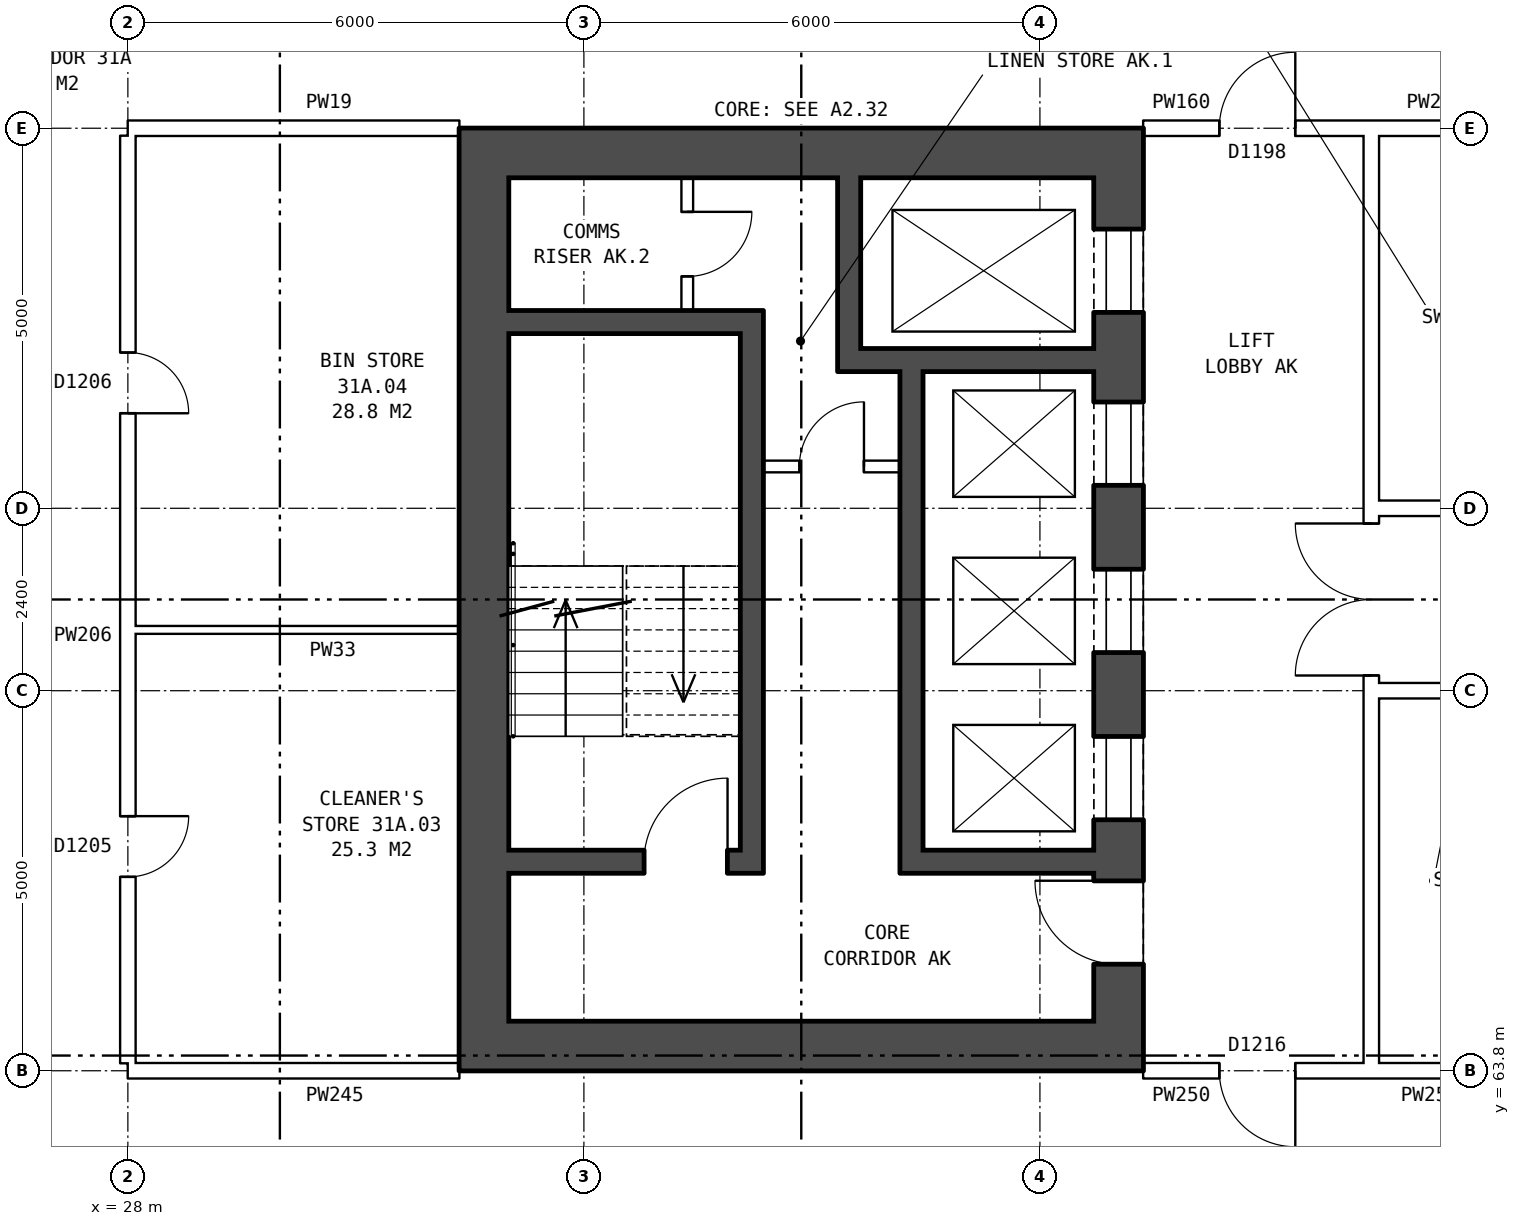
"""IFC4 building model, lengths in metres.
Left out: names, types, materials, properties, quantities, classifications, styles, units other than length and angle.
Written with IfcOpenShell. Run it as: python <this file> out.ifc"""

import sys

from ifc_helpers import new_model, si_unit, direction, frame, frame_2d, origin, place, context, subcontext, project, spatial, rectangle, extrude, element, fill, save


model = new_model("IFC4")
c1 = context("Model", 3, precision=1e-05, world=origin(), true_north=direction((0.0, 1.0)))
c2 = subcontext(c1, "Body", "Model", "MODEL_VIEW")
j1 = project(units=[si_unit("LENGTHUNIT", "METRE"), si_unit("PLANEANGLEUNIT", "RADIAN")], contexts=[c1])
p1 = place(None, origin())
s1 = spatial("IfcSite", under=j1, at=p1, CompositionType="ELEMENT")
p2 = place(p1, origin())
s2 = spatial("IfcBuilding", under=s1, at=p2, CompositionType="ELEMENT")
p3 = place(p2, frame((0.0, 0.0, 111.9)))
s3 = spatial("IfcBuildingStorey", under=s2, at=p3, CompositionType="ELEMENT", Elevation=111.9)
p4 = place(p3, frame((41.035, 75.55, 0.0), z_axis=(0.0, 0.0, 1.0), x_axis=(0.0, -1.0, 0.0)))
e1 = element("IfcWall", 1, at=p4, inside=s3, PredefinedType="SHEAR", context=c2, shape_type="SweptSolid", body=[
    extrude(rectangle(XDim=11.1, YDim=0.65, at=frame_2d((5.55, 0.0))), origin(), (0.0, 0.0, 1.0), 2.85),
])
p5 = place(p4, frame((0.675, 0.0, 0.0)))
e2 = element("IfcOpeningElement", 2, at=p5, cuts=e1, PredefinedType="OPENING", context=c2, shape_type="SweptSolid", body=[
    extrude(rectangle(XDim=1.1, YDim=2.1, at=frame_2d((0.55, 1.05))), frame((0.0, 0.335, 0.0), z_axis=(0.0, -1.0, 0.0), x_axis=(1.0, 0.0, 0.0)), (0.0, 0.0, 1.0), 0.67),
])
p6 = place(p4, frame((2.95, 0.0, 0.0)))
e3 = element("IfcOpeningElement", 3, at=p6, cuts=e1, PredefinedType="OPENING", context=c2, shape_type="SweptSolid", body=[
    extrude(rectangle(XDim=1.1, YDim=2.1, at=frame_2d((0.55, 1.05))), frame((0.0, 0.335, 0.0), z_axis=(0.0, -1.0, 0.0), x_axis=(1.0, 0.0, 0.0)), (0.0, 0.0, 1.0), 0.67),
])
p7 = place(p4, frame((5.15, 0.0, 0.0)))
e4 = element("IfcOpeningElement", 4, at=p7, cuts=e1, PredefinedType="OPENING", context=c2, shape_type="SweptSolid", body=[
    extrude(rectangle(XDim=1.1, YDim=2.1, at=frame_2d((0.55, 1.05))), frame((0.0, 0.335, 0.0), z_axis=(0.0, -1.0, 0.0), x_axis=(1.0, 0.0, 0.0)), (0.0, 0.0, 1.0), 0.67),
])
p8 = place(p4, frame((7.35, 0.0, 0.0)))
e5 = element("IfcOpeningElement", 5, at=p8, cuts=e1, PredefinedType="OPENING", context=c2, shape_type="SweptSolid", body=[
    extrude(rectangle(XDim=1.1, YDim=2.1, at=frame_2d((0.55, 1.05))), frame((0.0, 0.335, 0.0), z_axis=(0.0, -1.0, 0.0), x_axis=(1.0, 0.0, 0.0)), (0.0, 0.0, 1.0), 0.67),
])
p9 = place(p4, frame((9.25, 0.0, 0.0)))
e6 = element("IfcOpeningElement", 6, at=p9, cuts=e1, PredefinedType="OPENING", context=c2, shape_type="SweptSolid", body=[
    extrude(rectangle(XDim=1.1, YDim=2.1, at=frame_2d((0.55, 1.05))), frame((0.0, 0.335, 0.0), z_axis=(0.0, -1.0, 0.0), x_axis=(1.0, 0.0, 0.0)), (0.0, 0.0, 1.0), 0.67),
])
p10 = place(p3, frame((32.685, 75.55, 0.0), z_axis=(0.0, 0.0, 1.0), x_axis=(0.0, -1.0, 0.0)))
e7 = element("IfcWall", 7, at=p10, inside=s3, PredefinedType="SHEAR", context=c2, shape_type="SweptSolid", body=[
    extrude(rectangle(XDim=11.1, YDim=0.65, at=frame_2d((5.55, 0.0))), origin(), (0.0, 0.0, 1.0), 2.85),
])
for number, where, z_axis, x_axis in (
    (8, (41.36, 75.875, 0.0), (0.0, 0.0, 1.0), (-1.0, 0.0, 0.0)),
    (9, (41.36, 64.125, 0.0), (0.0, 0.0, 1.0), (-1.0, 0.0, 0.0)),
):
    element("IfcWall", number, at=place(p3, frame(where, z_axis=z_axis, x_axis=x_axis)), inside=s3, PredefinedType="SHEAR", context=c2, shape_type="SweptSolid", body=[
        extrude(rectangle(XDim=9.0, YDim=0.65, at=frame_2d((4.5, 0.0))), origin(), (0.0, 0.0, 1.0), 2.85),
    ])
p11 = place(p3, frame((36.06, 73.65, 0.0), z_axis=(0.0, 0.0, 1.0), x_axis=(-1.0, 0.0, 0.0)))
e10 = element("IfcWall", 10, at=p11, inside=s3, PredefinedType="SHEAR", context=c2, shape_type="SweptSolid", body=[
    extrude(rectangle(XDim=3.05, YDim=0.3, at=frame_2d((1.525, 0.0))), origin(), (0.0, 0.0, 1.0), 2.85),
])
p12 = place(p3, frame((40.71, 73.15, 0.0), z_axis=(0.0, 0.0, 1.0), x_axis=(-1.0, 0.0, 0.0)))
e11 = element("IfcWall", 11, at=p12, inside=s3, PredefinedType="SHEAR", context=c2, shape_type="SweptSolid", body=[
    extrude(rectangle(XDim=3.37, YDim=0.3, at=frame_2d((1.685, 0.0))), origin(), (0.0, 0.0, 1.0), 2.85),
])
p13 = place(p3, frame((38.16, 71.75, 0.0), z_axis=(0.0, 0.0, 1.0), x_axis=(-1.0, 0.0, 0.0)))
e12 = element("IfcWall", 12, at=p13, inside=s3, PredefinedType="PARTITIONING", context=c2, shape_type="SweptSolid", body=[
    extrude(rectangle(XDim=1.8, YDim=0.15, at=frame_2d((0.9, 0.0))), origin(), (0.0, 0.0, 1.0), 2.85),
])
p14 = place(p13, frame((0.475, 0.0, 0.0)))
e13 = element("IfcOpeningElement", 13, at=p14, cuts=e12, PredefinedType="OPENING", context=c2, shape_type="SweptSolid", body=[
    extrude(rectangle(XDim=0.85, YDim=2.1, at=frame_2d((0.425, 1.05))), frame((0.0, 0.085, 0.0), z_axis=(0.0, -1.0, 0.0), x_axis=(1.0, 0.0, 0.0)), (0.0, 0.0, 1.0), 0.17),
])
p15 = place(p3, frame((40.71, 66.55, 0.0), z_axis=(0.0, 0.0, 1.0), x_axis=(-1.0, 0.0, 0.0)))
e14 = element("IfcWall", 14, at=p15, inside=s3, PredefinedType="SHEAR", context=c2, shape_type="SweptSolid", body=[
    extrude(rectangle(XDim=2.25, YDim=0.3, at=frame_2d((1.125, 0.0))), origin(), (0.0, 0.0, 1.0), 2.85),
])
p16 = place(p3, frame((36.06, 66.55, 0.0), z_axis=(0.0, 0.0, 1.0), x_axis=(-1.0, 0.0, 0.0)))
e15 = element("IfcWall", 15, at=p16, inside=s3, PredefinedType="SHEAR", context=c2, shape_type="SweptSolid", body=[
    extrude(rectangle(XDim=3.05, YDim=0.3, at=frame_2d((1.525, 0.0))), origin(), (0.0, 0.0, 1.0), 2.85),
])
p17 = place(p16, frame((0.17, 0.0, 0.0)))
e16 = element("IfcOpeningElement", 16, at=p17, cuts=e15, PredefinedType="OPENING", context=c2, shape_type="SweptSolid", body=[
    extrude(rectangle(XDim=1.1, YDim=2.1, at=frame_2d((0.55, 1.05))), frame((0.0, 0.16, 0.0), z_axis=(0.0, -1.0, 0.0), x_axis=(1.0, 0.0, 0.0)), (0.0, 0.0, 1.0), 0.32),
])
p18 = place(p3, frame((38.31, 73.0, 0.0), z_axis=(0.0, 0.0, 1.0), x_axis=(0.0, -1.0, 0.0)))
e17 = element("IfcWall", 17, at=p18, inside=s3, PredefinedType="SHEAR", context=c2, shape_type="SweptSolid", body=[
    extrude(rectangle(XDim=6.6, YDim=0.3, at=frame_2d((3.3, 0.0))), origin(), (0.0, 0.0, 1.0), 2.85),
])
p19 = place(p3, frame((37.49, 75.55, 0.0), z_axis=(0.0, 0.0, 1.0), x_axis=(0.0, -1.0, 0.0)))
e18 = element("IfcWall", 18, at=p19, inside=s3, PredefinedType="SHEAR", context=c2, shape_type="SweptSolid", body=[
    extrude(rectangle(XDim=2.25, YDim=0.3, at=frame_2d((1.125, 0.0))), origin(), (0.0, 0.0, 1.0), 2.85),
])
p20 = place(p3, frame((36.21, 73.8, 0.0), z_axis=(0.0, 0.0, 1.0), x_axis=(0.0, -1.0, 0.0)))
e19 = element("IfcWall", 19, at=p20, inside=s3, PredefinedType="SHEAR", context=c2, shape_type="SweptSolid", body=[
    extrude(rectangle(XDim=7.4, YDim=0.3, at=frame_2d((3.7, 0.0))), origin(), (0.0, 0.0, 1.0), 2.85),
])
p21 = place(p3, frame((35.36, 75.55, 0.0), z_axis=(0.0, 0.0, 1.0), x_axis=(0.0, -1.0, 0.0)))
e20 = element("IfcWall", 20, at=p21, inside=s3, PredefinedType="PARTITIONING", context=c2, shape_type="SweptSolid", body=[
    extrude(rectangle(XDim=1.75, YDim=0.15, at=frame_2d((0.875, 0.0))), origin(), (0.0, 0.0, 1.0), 2.85),
])
p22 = place(p21, frame((0.45, 0.0, 0.0)))
e21 = element("IfcOpeningElement", 21, at=p22, cuts=e20, PredefinedType="OPENING", context=c2, shape_type="SweptSolid", body=[
    extrude(rectangle(XDim=0.85, YDim=2.1, at=frame_2d((0.425, 1.05))), frame((0.0, 0.085, 0.0), z_axis=(0.0, -1.0, 0.0), x_axis=(1.0, 0.0, 0.0)), (0.0, 0.0, 1.0), 0.17),
])
p23 = place(p3, frame((44.36, 63.9, 0.0), z_axis=(0.0, 0.0, 1.0), x_axis=(0.0, 1.0, 0.0)))
e22 = element("IfcWall", 22, at=p23, inside=s3, PredefinedType="PARTITIONING", context=c2, shape_type="SweptSolid", body=[
    extrude(rectangle(XDim=12.2, YDim=0.2, at=frame_2d((6.1, 0.0))), origin(), (0.0, 0.0, 1.0), 2.85),
])
p24 = place(p23, frame((5.1, 0.0, 0.0)))
e23 = element("IfcOpeningElement", 23, at=p24, cuts=e22, PredefinedType="OPENING", context=c2, shape_type="SweptSolid", body=[
    extrude(rectangle(XDim=2.0, YDim=2.1, at=frame_2d((1.0, 1.05))), frame((0.0, 0.11, 0.0), z_axis=(0.0, -1.0, 0.0), x_axis=(1.0, 0.0, 0.0)), (0.0, 0.0, 1.0), 0.22),
])
p25 = place(p3, frame((28.0, 63.8, 0.0), z_axis=(0.0, 0.0, 1.0), x_axis=(1.0, 0.0, 0.0)))
e24 = element("IfcWall", 24, at=p25, inside=s3, PredefinedType="PARTITIONING", context=c2, shape_type="SweptSolid", body=[
    extrude(rectangle(XDim=4.36, YDim=0.2, at=frame_2d((2.18, 0.0))), origin(), (0.0, 0.0, 1.0), 2.85),
])
p26 = place(p3, frame((41.36, 63.8, 0.0), z_axis=(0.0, 0.0, 1.0), x_axis=(1.0, 0.0, 0.0)))
e25 = element("IfcWall", 25, at=p26, inside=s3, PredefinedType="PARTITIONING", context=c2, shape_type="SweptSolid", body=[
    extrude(rectangle(XDim=3.0, YDim=0.2, at=frame_2d((1.5, 0.0))), origin(), (0.0, 0.0, 1.0), 2.85),
])
p27 = place(p26, frame((1.0, 0.0, 0.0)))
e26 = element("IfcOpeningElement", 26, at=p27, cuts=e25, PredefinedType="OPENING", context=c2, shape_type="SweptSolid", body=[
    extrude(rectangle(XDim=1.0, YDim=2.1, at=frame_2d((0.5, 1.05))), frame((0.0, 0.11, 0.0), z_axis=(0.0, -1.0, 0.0), x_axis=(1.0, 0.0, 0.0)), (0.0, 0.0, 1.0), 0.22),
])
p28 = place(p3, frame((44.36, 63.8, 0.0), z_axis=(0.0, 0.0, 1.0), x_axis=(1.0, 0.0, 0.0)))
e27 = element("IfcWall", 27, at=p28, inside=s3, PredefinedType="PARTITIONING", context=c2, shape_type="SweptSolid", body=[
    extrude(rectangle(XDim=1.54, YDim=0.2, at=frame_2d((0.77, 0.0))), origin(), (0.0, 0.0, 1.0), 2.85),
])
p29 = place(p3, frame((44.36, 68.8, 0.0), z_axis=(0.0, 0.0, 1.0), x_axis=(1.0, 0.0, 0.0)))
e28 = element("IfcWall", 28, at=p29, inside=s3, PredefinedType="PARTITIONING", context=c2, shape_type="SweptSolid", body=[
    extrude(rectangle(XDim=19.28, YDim=0.2, at=frame_2d((9.64, 0.0))), origin(), (0.0, 0.0, 1.0), 2.85),
])
p30 = place(p29, frame((17.46, 0.0, 0.0)))
e29 = element("IfcOpeningElement", 29, at=p30, cuts=e28, PredefinedType="OPENING", context=c2, shape_type="SweptSolid", body=[
    extrude(rectangle(XDim=1.0, YDim=2.1, at=frame_2d((0.5, 1.05))), frame((0.0, 0.11, 0.0), z_axis=(0.0, -1.0, 0.0), x_axis=(1.0, 0.0, 0.0)), (0.0, 0.0, 1.0), 0.22),
])
p31 = place(p29, frame((11.64, 0.0, 0.0)))
e30 = element("IfcOpeningElement", 30, at=p31, cuts=e28, PredefinedType="OPENING", context=c2, shape_type="SweptSolid", body=[
    extrude(rectangle(XDim=1.0, YDim=2.1, at=frame_2d((0.5, 1.05))), frame((0.0, 0.11, 0.0), z_axis=(0.0, -1.0, 0.0), x_axis=(1.0, 0.0, 0.0)), (0.0, 0.0, 1.0), 0.22),
])
p32 = place(p29, frame((2.64, 0.0, 0.0)))
e31 = element("IfcOpeningElement", 31, at=p32, cuts=e28, PredefinedType="OPENING", context=c2, shape_type="SweptSolid", body=[
    extrude(rectangle(XDim=1.0, YDim=2.1, at=frame_2d((0.5, 1.05))), frame((0.0, 0.11, 0.0), z_axis=(0.0, -1.0, 0.0), x_axis=(1.0, 0.0, 0.0)), (0.0, 0.0, 1.0), 0.22),
])
p33 = place(p3, frame((28.1, 69.6, 0.0), z_axis=(0.0, 0.0, 1.0), x_axis=(1.0, 0.0, 0.0)))
e32 = element("IfcWall", 32, at=p33, inside=s3, PredefinedType="PARTITIONING", context=c2, shape_type="SweptSolid", body=[
    extrude(rectangle(XDim=4.26, YDim=0.1, at=frame_2d((2.13, 0.0))), origin(), (0.0, 0.0, 1.0), 2.85),
])
p34 = place(p3, frame((44.36, 71.2, 0.0), z_axis=(0.0, 0.0, 1.0), x_axis=(1.0, 0.0, 0.0)))
e33 = element("IfcWall", 33, at=p34, inside=s3, PredefinedType="PARTITIONING", context=c2, shape_type="SweptSolid", body=[
    extrude(rectangle(XDim=19.28, YDim=0.2, at=frame_2d((9.64, 0.0))), origin(), (0.0, 0.0, 1.0), 2.85),
])
p35 = place(p34, frame((14.64, 0.0, 0.0)))
e34 = element("IfcOpeningElement", 34, at=p35, cuts=e33, PredefinedType="OPENING", context=c2, shape_type="SweptSolid", body=[
    extrude(rectangle(XDim=1.0, YDim=2.1, at=frame_2d((0.5, 1.05))), frame((0.0, 0.11, 0.0), z_axis=(0.0, -1.0, 0.0), x_axis=(1.0, 0.0, 0.0)), (0.0, 0.0, 1.0), 0.22),
])
p36 = place(p34, frame((5.64, 0.0, 0.0)))
e35 = element("IfcOpeningElement", 35, at=p36, cuts=e33, PredefinedType="OPENING", context=c2, shape_type="SweptSolid", body=[
    extrude(rectangle(XDim=1.0, YDim=2.1, at=frame_2d((0.5, 1.05))), frame((0.0, 0.11, 0.0), z_axis=(0.0, -1.0, 0.0), x_axis=(1.0, 0.0, 0.0)), (0.0, 0.0, 1.0), 0.22),
])
p37 = place(p3, frame((28.0, 76.2, 0.0), z_axis=(0.0, 0.0, 1.0), x_axis=(1.0, 0.0, 0.0)))
e36 = element("IfcWall", 36, at=p37, inside=s3, PredefinedType="PARTITIONING", context=c2, shape_type="SweptSolid", body=[
    extrude(rectangle(XDim=4.36, YDim=0.2, at=frame_2d((2.18, 0.0))), origin(), (0.0, 0.0, 1.0), 2.85),
])
p38 = place(p3, frame((41.36, 76.2, 0.0), z_axis=(0.0, 0.0, 1.0), x_axis=(1.0, 0.0, 0.0)))
e37 = element("IfcWall", 37, at=p38, inside=s3, PredefinedType="PARTITIONING", context=c2, shape_type="SweptSolid", body=[
    extrude(rectangle(XDim=3.0, YDim=0.2, at=frame_2d((1.5, 0.0))), origin(), (0.0, 0.0, 1.0), 2.85),
])
p39 = place(p38, frame((1.0, 0.0, 0.0)))
e38 = element("IfcOpeningElement", 38, at=p39, cuts=e37, PredefinedType="OPENING", context=c2, shape_type="SweptSolid", body=[
    extrude(rectangle(XDim=1.0, YDim=2.1, at=frame_2d((0.5, 1.05))), frame((0.0, 0.11, 0.0), z_axis=(0.0, -1.0, 0.0), x_axis=(1.0, 0.0, 0.0)), (0.0, 0.0, 1.0), 0.22),
])
p40 = place(p3, frame((44.36, 76.2, 0.0), z_axis=(0.0, 0.0, 1.0), x_axis=(1.0, 0.0, 0.0)))
e39 = element("IfcWall", 39, at=p40, inside=s3, PredefinedType="PARTITIONING", context=c2, shape_type="SweptSolid", body=[
    extrude(rectangle(XDim=1.54, YDim=0.2, at=frame_2d((0.77, 0.0))), origin(), (0.0, 0.0, 1.0), 2.85),
])
p41 = place(p3, frame((28.0, 63.9, 0.0), z_axis=(0.0, 0.0, 1.0), x_axis=(0.0, 1.0, 0.0)))
e40 = element("IfcWall", 40, at=p41, inside=s3, PredefinedType="PARTITIONING", context=c2, shape_type="SweptSolid", body=[
    extrude(rectangle(XDim=12.2, YDim=0.2, at=frame_2d((6.1, 0.0))), origin(), (0.0, 0.0, 1.0), 2.85),
])
p42 = place(p41, frame((2.45, 0.0, 0.0)))
e41 = element("IfcOpeningElement", 41, at=p42, cuts=e40, PredefinedType="OPENING", context=c2, shape_type="SweptSolid", body=[
    extrude(rectangle(XDim=0.8, YDim=2.1, at=frame_2d((0.4, 1.05))), frame((0.0, 0.11, 0.0), z_axis=(0.0, -1.0, 0.0), x_axis=(1.0, 0.0, 0.0)), (0.0, 0.0, 1.0), 0.22),
])
p43 = place(p41, frame((8.55, 0.0, 0.0)))
e42 = element("IfcOpeningElement", 42, at=p43, cuts=e40, PredefinedType="OPENING", context=c2, shape_type="SweptSolid", body=[
    extrude(rectangle(XDim=0.8, YDim=2.1, at=frame_2d((0.4, 1.05))), frame((0.0, 0.11, 0.0), z_axis=(0.0, -1.0, 0.0), x_axis=(1.0, 0.0, 0.0)), (0.0, 0.0, 1.0), 0.22),
])
p44 = place(p5, origin())
e43 = element("IfcDoor", 43, at=p44, inside=s3, OperationType="DOUBLE_DOOR_SLIDING", PredefinedType="DOOR", context=c2, shape_type="SweptSolid", body=[
    extrude(rectangle(XDim=1.1, YDim=2.1, at=frame_2d((0.55, 1.05))), frame((0.0, -0.26, 0.0), z_axis=(0.0, -1.0, 0.0), x_axis=(1.0, 0.0, 0.0)), (0.0, 0.0, 1.0), 0.05),
])
fill(e2, e43)
p45 = place(p6, origin())
e44 = element("IfcDoor", 44, at=p45, inside=s3, OperationType="DOUBLE_DOOR_SLIDING", PredefinedType="DOOR", context=c2, shape_type="SweptSolid", body=[
    extrude(rectangle(XDim=1.1, YDim=2.1, at=frame_2d((0.55, 1.05))), frame((0.0, -0.26, 0.0), z_axis=(0.0, -1.0, 0.0), x_axis=(1.0, 0.0, 0.0)), (0.0, 0.0, 1.0), 0.05),
])
fill(e3, e44)
p46 = place(p7, origin())
e45 = element("IfcDoor", 45, at=p46, inside=s3, OperationType="DOUBLE_DOOR_SLIDING", PredefinedType="DOOR", context=c2, shape_type="SweptSolid", body=[
    extrude(rectangle(XDim=1.1, YDim=2.1, at=frame_2d((0.55, 1.05))), frame((0.0, -0.26, 0.0), z_axis=(0.0, -1.0, 0.0), x_axis=(1.0, 0.0, 0.0)), (0.0, 0.0, 1.0), 0.05),
])
fill(e4, e45)
p47 = place(p8, origin())
e46 = element("IfcDoor", 46, at=p47, inside=s3, OperationType="DOUBLE_DOOR_SLIDING", PredefinedType="DOOR", context=c2, shape_type="SweptSolid", body=[
    extrude(rectangle(XDim=1.1, YDim=2.1, at=frame_2d((0.55, 1.05))), frame((0.0, -0.26, 0.0), z_axis=(0.0, -1.0, 0.0), x_axis=(1.0, 0.0, 0.0)), (0.0, 0.0, 1.0), 0.05),
])
fill(e5, e46)
p48 = place(p9, frame((1.1, 0.0, 0.0), z_axis=(0.0, 0.0, 1.0), x_axis=(-1.0, 0.0, 0.0)))
e47 = element("IfcDoor", 47, at=p48, inside=s3, OperationType="SINGLE_SWING_RIGHT", PredefinedType="DOOR", context=c2, shape_type="SweptSolid", body=[
    extrude(rectangle(XDim=1.1, YDim=2.1, at=frame_2d((0.55, 1.05))), frame((0.0, 0.31, 0.0), z_axis=(0.0, -1.0, 0.0), x_axis=(1.0, 0.0, 0.0)), (0.0, 0.0, 1.0), 0.05),
])
fill(e6, e47)
p49 = place(p17, frame((1.1, 0.0, 0.0), z_axis=(0.0, 0.0, 1.0), x_axis=(-1.0, 0.0, 0.0)))
e48 = element("IfcDoor", 48, at=p49, inside=s3, OperationType="SINGLE_SWING_RIGHT", PredefinedType="DOOR", context=c2, shape_type="SweptSolid", body=[
    extrude(rectangle(XDim=1.1, YDim=2.1, at=frame_2d((0.55, 1.05))), frame((0.0, 0.025, 0.0), z_axis=(0.0, -1.0, 0.0), x_axis=(1.0, 0.0, 0.0)), (0.0, 0.0, 1.0), 0.05),
])
fill(e16, e48)
p50 = place(p14, frame((0.85, 0.0, 0.0), z_axis=(0.0, 0.0, 1.0), x_axis=(-1.0, 0.0, 0.0)))
e49 = element("IfcDoor", 49, at=p50, inside=s3, OperationType="SINGLE_SWING_RIGHT", PredefinedType="DOOR", context=c2, shape_type="SweptSolid", body=[
    extrude(rectangle(XDim=0.85, YDim=2.1, at=frame_2d((0.425, 1.05))), frame((0.0, 0.025, 0.0), z_axis=(0.0, -1.0, 0.0), x_axis=(1.0, 0.0, 0.0)), (0.0, 0.0, 1.0), 0.05),
])
fill(e13, e49)
p51 = place(p22, origin())
e50 = element("IfcDoor", 50, at=p51, inside=s3, OperationType="SINGLE_SWING_LEFT", PredefinedType="DOOR", context=c2, shape_type="SweptSolid", body=[
    extrude(rectangle(XDim=0.85, YDim=2.1, at=frame_2d((0.425, 1.05))), frame((0.0, 0.025, 0.0), z_axis=(0.0, -1.0, 0.0), x_axis=(1.0, 0.0, 0.0)), (0.0, 0.0, 1.0), 0.05),
])
fill(e21, e50)
p52 = place(p24, origin())
e51 = element("IfcDoor", 51, at=p52, inside=s3, OperationType="DOUBLE_DOOR_SINGLE_SWING", PredefinedType="DOOR", context=c2, shape_type="SweptSolid", body=[
    extrude(rectangle(XDim=2.0, YDim=2.1, at=frame_2d((1.0, 1.05))), frame((0.0, 0.025, 0.0), z_axis=(0.0, -1.0, 0.0), x_axis=(1.0, 0.0, 0.0)), (0.0, 0.0, 1.0), 0.05),
])
fill(e23, e51)
p53 = place(p27, frame((1.0, 0.0, 0.0), z_axis=(0.0, 0.0, 1.0), x_axis=(-1.0, 0.0, 0.0)))
e52 = element("IfcDoor", 52, at=p53, inside=s3, OperationType="SINGLE_SWING_LEFT", PredefinedType="DOOR", context=c2, shape_type="SweptSolid", body=[
    extrude(rectangle(XDim=1.0, YDim=2.1, at=frame_2d((0.5, 1.05))), frame((0.0, 0.025, 0.0), z_axis=(0.0, -1.0, 0.0), x_axis=(1.0, 0.0, 0.0)), (0.0, 0.0, 1.0), 0.05),
])
fill(e26, e52)
p54 = place(p39, origin())
e53 = element("IfcDoor", 53, at=p54, inside=s3, OperationType="SINGLE_SWING_RIGHT", PredefinedType="DOOR", context=c2, shape_type="SweptSolid", body=[
    extrude(rectangle(XDim=1.0, YDim=2.1, at=frame_2d((0.5, 1.05))), frame((0.0, 0.025, 0.0), z_axis=(0.0, -1.0, 0.0), x_axis=(1.0, 0.0, 0.0)), (0.0, 0.0, 1.0), 0.05),
])
fill(e38, e53)
p55 = place(p42, frame((0.8, 0.0, 0.0), z_axis=(0.0, 0.0, 1.0), x_axis=(-1.0, 0.0, 0.0)))
e54 = element("IfcDoor", 54, at=p55, inside=s3, OperationType="SINGLE_SWING_LEFT", PredefinedType="DOOR", context=c2, shape_type="SweptSolid", body=[
    extrude(rectangle(XDim=0.8, YDim=2.1, at=frame_2d((0.4, 1.05))), frame((0.0, 0.025, 0.0), z_axis=(0.0, -1.0, 0.0), x_axis=(1.0, 0.0, 0.0)), (0.0, 0.0, 1.0), 0.05),
])
fill(e41, e54)
p56 = place(p43, frame((0.8, 0.0, 0.0), z_axis=(0.0, 0.0, 1.0), x_axis=(-1.0, 0.0, 0.0)))
e55 = element("IfcDoor", 55, at=p56, inside=s3, OperationType="SINGLE_SWING_RIGHT", PredefinedType="DOOR", context=c2, shape_type="SweptSolid", body=[
    extrude(rectangle(XDim=0.8, YDim=2.1, at=frame_2d((0.4, 1.05))), frame((0.0, 0.025, 0.0), z_axis=(0.0, -1.0, 0.0), x_axis=(1.0, 0.0, 0.0)), (0.0, 0.0, 1.0), 0.05),
])
fill(e42, e55)
save(model, sys.argv[1])
